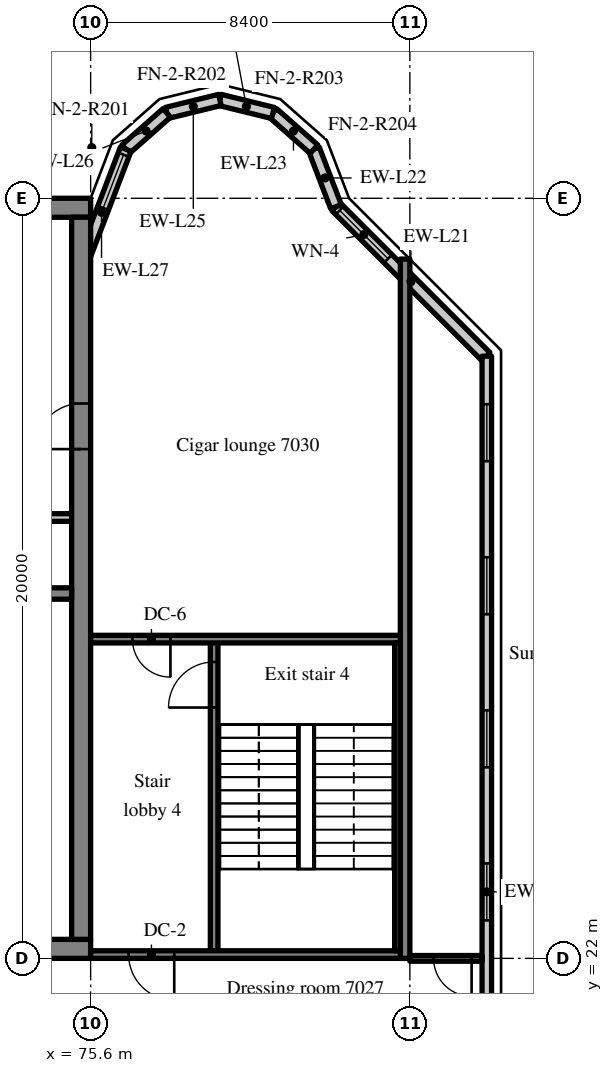
"""IFC4 building model, lengths in metres.
Left out: names, types, materials, properties, quantities, classifications, styles, units other than length and angle.
Written with IfcOpenShell. Run it as: python <this file> out.ifc"""

import sys

from ifc_helpers import new_model, si_unit, direction, frame, frame_2d, origin, place, context, subcontext, project, spatial, rectangle, extrude, source, transform, mapped, element, fill, save


model = new_model("IFC4")
c1 = context("Model", 3, precision=1e-05, world=origin(), true_north=direction((0.0, 1.0)))
c2 = subcontext(c1, "Body", "Model", "MODEL_VIEW")
j1 = project(units=[si_unit("LENGTHUNIT", "METRE"), si_unit("PLANEANGLEUNIT", "RADIAN")], contexts=[c1])
p1 = place(None, origin())
s1 = spatial("IfcSite", under=j1, at=p1, CompositionType="ELEMENT")
p2 = place(p1, origin())
s2 = spatial("IfcBuilding", under=s1, at=p2, CompositionType="ELEMENT")
p3 = place(p2, frame((0.0, 0.0, 293.7)))
s3 = spatial("IfcBuildingStorey", under=s2, at=p3, CompositionType="ELEMENT", Elevation=293.7)
m1 = source(origin(), c2, "Body", "SweptSolid", [
    extrude(rectangle(XDim=50.4, YDim=0.5, at=frame_2d((25.2, 0.0))), origin(), (0.0, 0.0, 1.0), 3.72),
])
p4 = place(p3, frame((25.2, 22.25, 0.0), z_axis=(0.0, 0.0, 1.0), x_axis=(1.0, 0.0, 0.0)))
e1 = element("IfcWall", 1, at=p4, inside=s3, PredefinedType="SHEAR", context=c2, shape_type="MappedRepresentation", body=[
    mapped(m1, transform((0.0, 0.0, 0.0), scale=1.0)),
])
m2 = source(origin(), c2, "Body", "SweptSolid", [
    extrude(rectangle(XDim=1.8, YDim=2.1, at=frame_2d((0.9, 1.05))), frame((0.0, 0.26, 0.0), z_axis=(0.0, -1.0, 0.0), x_axis=(1.0, 0.0, 0.0)), (0.0, 0.0, 1.0), 0.52),
])
p5 = place(p4, frame((15.9, 0.0, 0.0)))
e2 = element("IfcOpeningElement", 2, at=p5, cuts=e1, PredefinedType="OPENING", context=c2, shape_type="MappedRepresentation", body=[
    mapped(m2, transform((0.0, 0.0, 0.0), scale=1.0)),
])
m3 = source(origin(), c2, "Body", "SweptSolid", [
    extrude(rectangle(XDim=0.9, YDim=2.1, at=frame_2d((0.45, 1.05))), frame((0.0, 0.26, 0.0), z_axis=(0.0, -1.0, 0.0), x_axis=(1.0, 0.0, 0.0)), (0.0, 0.0, 1.0), 0.52),
])
p6 = place(p4, frame((9.675, 0.0, 0.0)))
e3 = element("IfcOpeningElement", 3, at=p6, cuts=e1, PredefinedType="OPENING", context=c2, shape_type="MappedRepresentation", body=[
    mapped(m3, transform((0.0, 0.0, 0.0), scale=1.0)),
])
p7 = place(p4, frame((21.525, 0.0, 0.0)))
e4 = element("IfcOpeningElement", 4, at=p7, cuts=e1, PredefinedType="OPENING", context=c2, shape_type="MappedRepresentation", body=[
    mapped(m3, transform((0.0, 0.0, 0.0), scale=1.0)),
])
p8 = place(p4, frame((32.7, 0.0, 0.0)))
e5 = element("IfcOpeningElement", 5, at=p8, cuts=e1, PredefinedType="OPENING", context=c2, shape_type="MappedRepresentation", body=[
    mapped(m2, transform((0.0, 0.0, 0.0), scale=1.0)),
])
m4 = source(origin(), c2, "Body", "SweptSolid", [
    extrude(rectangle(XDim=1.2, YDim=2.1, at=frame_2d((0.6, 1.05))), frame((0.0, 0.26, 0.0), z_axis=(0.0, -1.0, 0.0), x_axis=(1.0, 0.0, 0.0)), (0.0, 0.0, 1.0), 0.52),
])
p9 = place(p4, frame((6.5, 0.0, 0.0)))
e6 = element("IfcOpeningElement", 6, at=p9, cuts=e1, PredefinedType="OPENING", context=c2, shape_type="MappedRepresentation", body=[
    mapped(m4, transform((0.0, 0.0, 0.0), scale=1.0)),
])
p10 = place(p4, frame((47.975, 0.0, 0.0)))
e7 = element("IfcOpeningElement", 7, at=p10, cuts=e1, PredefinedType="OPENING", context=c2, shape_type="MappedRepresentation", body=[
    mapped(m4, transform((0.0, 0.0, 0.0), scale=1.0)),
])
p11 = place(p3, frame((25.2, 41.75, 0.0), z_axis=(0.0, 0.0, 1.0), x_axis=(1.0, 0.0, 0.0)))
e8 = element("IfcWall", 8, at=p11, inside=s3, PredefinedType="SHEAR", context=c2, shape_type="MappedRepresentation", body=[
    mapped(m1, transform((0.0, 0.0, 0.0), scale=1.0)),
])
m5 = source(origin(), c2, "Body", "SweptSolid", [
    extrude(rectangle(XDim=19.0, YDim=0.5, at=frame_2d((9.5, 0.0))), origin(), (0.0, 0.0, 1.0), 3.72),
])
p12 = place(p3, frame((75.35, 22.5, 0.0), z_axis=(0.0, 0.0, 1.0), x_axis=(0.0, 1.0, 0.0)))
e9 = element("IfcWall", 9, at=p12, inside=s3, PredefinedType="SHEAR", context=c2, shape_type="MappedRepresentation", body=[
    mapped(m5, transform((0.0, 0.0, 0.0), scale=1.0)),
])
p13 = place(p12, frame((12.9, 0.0, 0.0)))
e10 = element("IfcOpeningElement", 10, at=p13, cuts=e9, PredefinedType="OPENING", context=c2, shape_type="MappedRepresentation", body=[
    mapped(m4, transform((0.0, 0.0, 0.0), scale=1.0)),
])
m6 = source(origin(), c2, "Body", "SweptSolid", [
    extrude(rectangle(XDim=7.75, YDim=0.3, at=frame_2d((3.875, 0.0))), origin(), (0.0, 0.0, 1.0), 3.72),
])
p14 = place(p3, frame((67.35, 31.6, 0.0), z_axis=(0.0, 0.0, 1.0), x_axis=(1.0, 0.0, 0.0)))
e11 = element("IfcWall", 11, at=p14, inside=s3, PredefinedType="SHEAR", context=c2, shape_type="MappedRepresentation", body=[
    mapped(m6, transform((0.0, 0.0, 0.0), scale=1.0)),
])
m7 = source(origin(), c2, "Body", "SweptSolid", [
    extrude(rectangle(XDim=1.1, YDim=2.1, at=frame_2d((0.55, 1.05))), frame((0.0, 0.16, 0.0), z_axis=(0.0, -1.0, 0.0), x_axis=(1.0, 0.0, 0.0)), (0.0, 0.0, 1.0), 0.32),
])
p15 = place(p14, frame((5.875, 0.0, 0.0)))
e12 = element("IfcOpeningElement", 12, at=p15, cuts=e11, PredefinedType="OPENING", context=c2, shape_type="MappedRepresentation", body=[
    mapped(m7, transform((0.0, 0.0, 0.0), scale=1.0)),
])
m8 = source(origin(), c2, "Body", "SweptSolid", [
    extrude(rectangle(XDim=18.4, YDim=0.25, at=frame_2d((9.2, 0.0))), origin(), (0.0, 0.0, 1.0), 3.72),
])
p16 = place(p3, frame((83.875, 22.0, 0.0), z_axis=(0.0, 0.0, 1.0), x_axis=(0.0, 1.0, 0.0)))
e13 = element("IfcWall", 13, at=p16, inside=s3, PredefinedType="SHEAR", context=c2, shape_type="MappedRepresentation", body=[
    mapped(m8, transform((0.0, 0.0, 0.0), scale=1.0)),
])
m9 = source(origin(), c2, "Body", "SweptSolid", [
    extrude(rectangle(XDim=5.576, YDim=0.3, at=frame_2d((2.788, 0.0))), origin(), (0.0, 0.0, 1.0), 3.72),
])
p17 = place(p3, frame((86.0, 37.834, 0.0), z_axis=(0.0, 0.0, 1.0), x_axis=(-0.707106781187, 0.707106781187, 0.0)))
e14 = element("IfcWall", 14, at=p17, inside=s3, PredefinedType="SOLIDWALL", context=c2, shape_type="MappedRepresentation", body=[
    mapped(m9, transform((0.0, 0.0, 0.0), scale=1.0)),
])
m10 = source(origin(), c2, "Body", "SweptSolid", [
    extrude(rectangle(XDim=1.8, YDim=1.5, at=frame_2d((0.9, 0.75))), frame((0.0, 0.16, 0.0), z_axis=(0.0, -1.0, 0.0), x_axis=(1.0, 0.0, 0.0)), (0.0, 0.0, 1.0), 0.32),
])
p18 = place(p17, frame((3.641, 0.0, 0.9)))
e15 = element("IfcOpeningElement", 15, at=p18, cuts=e14, PredefinedType="OPENING", context=c2, shape_type="MappedRepresentation", body=[
    mapped(m10, transform((0.0, 0.0, 0.0), scale=1.0)),
])
m11 = source(origin(), c2, "Body", "SweptSolid", [
    extrude(rectangle(XDim=1.622, YDim=0.3, at=frame_2d((0.811, 0.0))), origin(), (0.0, 0.0, 1.0), 3.72),
])
p19 = place(p3, frame((82.057, 41.777, 0.0), z_axis=(0.0, 0.0, 1.0), x_axis=(-0.357778527068, 0.933806471154, 0.0)))
e16 = element("IfcWall", 16, at=p19, inside=s3, PredefinedType="SOLIDWALL", context=c2, shape_type="MappedRepresentation", body=[
    mapped(m11, transform((0.0, 0.0, 0.0), scale=1.0)),
])
m12 = source(origin(), c2, "Body", "SweptSolid", [
    extrude(rectangle(XDim=1.44, YDim=0.3, at=frame_2d((0.72, 0.0))), origin(), (0.0, 0.0, 1.0), 3.72),
])
p20 = place(p3, frame((81.477, 43.292, 0.0), z_axis=(0.0, 0.0, 1.0), x_axis=(-0.74957555648, 0.661918790432, 0.0)))
e17 = element("IfcWall", 17, at=p20, inside=s3, PredefinedType="SOLIDWALL", context=c2, shape_type="MappedRepresentation", body=[
    mapped(m12, transform((0.0, 0.0, 0.0), scale=1.0)),
])
m13 = source(origin(), c2, "Body", "SweptSolid", [
    extrude(rectangle(XDim=1.439, YDim=0.3, at=frame_2d((0.719, 0.0))), origin(), (0.0, 0.0, 1.0), 3.72),
])
for number, where, z_axis, x_axis in (
    (18, (80.397, 44.245, 0.0), (0.0, 0.0, 1.0), (-0.971, 0.238, 0.0)),
    (19, (79.0, 44.588, 0.0), (0.0, 0.0, 1.0), (-0.971, -0.238, 0.0)),
):
    element("IfcWall", number, at=place(p3, frame(where, z_axis=z_axis, x_axis=x_axis)), inside=s3, PredefinedType="SOLIDWALL", context=c2, shape_type="MappedRepresentation", body=[
        mapped(m13, transform((0.0, 0.0, 0.0), scale=1.0)),
    ])
p21 = place(p3, frame((77.603, 44.245, 0.0), z_axis=(0.0, 0.0, 1.0), x_axis=(-0.74957555648, -0.661918790432, 0.0)))
e20 = element("IfcWall", 20, at=p21, inside=s3, PredefinedType="SOLIDWALL", context=c2, shape_type="MappedRepresentation", body=[
    mapped(m12, transform((0.0, 0.0, 0.0), scale=1.0)),
])
m14 = source(origin(), c2, "Body", "SweptSolid", [
    extrude(rectangle(XDim=3.559, YDim=0.3, at=frame_2d((1.78, 0.0))), origin(), (0.0, 0.0, 1.0), 3.72),
])
p22 = place(p3, frame((76.523, 43.292, 0.0), z_axis=(0.0, 0.0, 1.0), x_axis=(-0.35779745313, -0.933799219604, 0.0)))
e21 = element("IfcWall", 21, at=p22, inside=s3, PredefinedType="SOLIDWALL", context=c2, shape_type="MappedRepresentation", body=[
    mapped(m14, transform((0.0, 0.0, 0.0), scale=1.0)),
])
m15 = source(origin(), c2, "Body", "SweptSolid", [
    extrude(rectangle(XDim=1.5, YDim=2.0, at=frame_2d((0.75, 1.0))), frame((0.0, 0.16, 0.0), z_axis=(0.0, -1.0, 0.0), x_axis=(1.0, 0.0, 0.0)), (0.0, 0.0, 1.0), 0.32),
])
p23 = place(p22, frame((0.156, 0.0, 0.9)))
e22 = element("IfcOpeningElement", 22, at=p23, cuts=e21, PredefinedType="OPENING", context=c2, shape_type="MappedRepresentation", body=[
    mapped(m15, transform((0.0, 0.0, 0.0), scale=1.0)),
])
m16 = source(origin(), c2, "Body", "SweptSolid", [
    extrude(rectangle(XDim=28.189, YDim=0.25, at=frame_2d((14.095, 0.0))), origin(), (0.0, 0.0, 1.0), 3.72),
])
p24 = place(p3, frame((86.025, 9.655, 0.0), z_axis=(0.0, 0.0, 1.0), x_axis=(0.0, 1.0, 0.0)))
e23 = element("IfcWall", 23, at=p24, inside=s3, PredefinedType="SOLIDWALL", context=c2, shape_type="MappedRepresentation", body=[
    mapped(m16, transform((0.0, 0.0, 0.0), scale=1.0)),
])
m17 = source(origin(), c2, "Body", "SweptSolid", [
    extrude(rectangle(XDim=1.5, YDim=1.5, at=frame_2d((0.75, 0.75))), frame((0.0, 0.135, 0.0), z_axis=(0.0, -1.0, 0.0), x_axis=(1.0, 0.0, 0.0)), (0.0, 0.0, 1.0), 0.27),
])
p25 = place(p24, frame((1.263, 0.0, 0.9)))
e24 = element("IfcOpeningElement", 24, at=p25, cuts=e23, PredefinedType="OPENING", context=c2, shape_type="MappedRepresentation", body=[
    mapped(m17, transform((0.0, 0.0, 0.0), scale=1.0)),
])
p26 = place(p24, frame((5.291, 0.0, 0.9)))
e25 = element("IfcOpeningElement", 25, at=p26, cuts=e23, PredefinedType="OPENING", context=c2, shape_type="MappedRepresentation", body=[
    mapped(m17, transform((0.0, 0.0, 0.0), scale=1.0)),
])
p27 = place(p24, frame((9.318, 0.0, 0.9)))
e26 = element("IfcOpeningElement", 26, at=p27, cuts=e23, PredefinedType="OPENING", context=c2, shape_type="MappedRepresentation", body=[
    mapped(m17, transform((0.0, 0.0, 0.0), scale=1.0)),
])
p28 = place(p24, frame((13.345, 0.0, 0.9)))
e27 = element("IfcOpeningElement", 27, at=p28, cuts=e23, PredefinedType="OPENING", context=c2, shape_type="MappedRepresentation", body=[
    mapped(m17, transform((0.0, 0.0, 0.0), scale=1.0)),
])
p29 = place(p24, frame((17.372, 0.0, 0.9)))
e28 = element("IfcOpeningElement", 28, at=p29, cuts=e23, PredefinedType="OPENING", context=c2, shape_type="MappedRepresentation", body=[
    mapped(m17, transform((0.0, 0.0, 0.0), scale=1.0)),
])
p30 = place(p24, frame((21.399, 0.0, 0.9)))
e29 = element("IfcOpeningElement", 29, at=p30, cuts=e23, PredefinedType="OPENING", context=c2, shape_type="MappedRepresentation", body=[
    mapped(m17, transform((0.0, 0.0, 0.0), scale=1.0)),
])
p31 = place(p24, frame((25.426, 0.0, 0.9)))
e30 = element("IfcOpeningElement", 30, at=p31, cuts=e23, PredefinedType="OPENING", context=c2, shape_type="MappedRepresentation", body=[
    mapped(m17, transform((0.0, 0.0, 0.0), scale=1.0)),
])
m18 = source(origin(), c2, "Body", "SweptSolid", [
    extrude(rectangle(XDim=2.65, YDim=0.2, at=frame_2d((1.325, 0.0))), origin(), (0.0, 0.0, 1.0), 3.72),
])
p32 = place(p3, frame((72.45, 33.6, 0.0), z_axis=(0.0, 0.0, 1.0), x_axis=(1.0, 0.0, 0.0)))
e31 = element("IfcWall", 31, at=p32, inside=s3, PredefinedType="SOLIDWALL", context=c2, shape_type="MappedRepresentation", body=[
    mapped(m18, transform((0.0, 0.0, 0.0), scale=1.0)),
])
m19 = source(origin(), c2, "Body", "SweptSolid", [
    extrude(rectangle(XDim=8.3, YDim=0.2, at=frame_2d((4.15, 0.0))), origin(), (0.0, 0.0, 1.0), 3.72),
])
p33 = place(p3, frame((78.85, 22.1, 0.0), z_axis=(0.0, 0.0, 1.0), x_axis=(0.0, 1.0, 0.0)))
e32 = element("IfcWall", 32, at=p33, inside=s3, PredefinedType="SOLIDWALL", context=c2, shape_type="MappedRepresentation", body=[
    mapped(m19, transform((0.0, 0.0, 0.0), scale=1.0)),
])
m20 = source(origin(), c2, "Body", "SweptSolid", [
    extrude(rectangle(XDim=1.2, YDim=2.1, at=frame_2d((0.6, 1.05))), frame((0.0, 0.11, 0.0), z_axis=(0.0, -1.0, 0.0), x_axis=(1.0, 0.0, 0.0)), (0.0, 0.0, 1.0), 0.22),
])
p34 = place(p33, frame((6.5, 0.0, 0.0)))
e33 = element("IfcOpeningElement", 33, at=p34, cuts=e32, PredefinedType="OPENING", context=c2, shape_type="MappedRepresentation", body=[
    mapped(m20, transform((0.0, 0.0, 0.0), scale=1.0)),
])
m21 = source(origin(), c2, "Body", "SweptSolid", [
    extrude(rectangle(XDim=8.15, YDim=0.2, at=frame_2d((4.075, 0.0))), origin(), (0.0, 0.0, 1.0), 3.72),
])
p35 = place(p3, frame((83.75, 22.1, 0.0), z_axis=(0.0, 0.0, 1.0), x_axis=(-1.0, 0.0, 0.0)))
e34 = element("IfcWall", 34, at=p35, inside=s3, PredefinedType="SOLIDWALL", context=c2, shape_type="MappedRepresentation", body=[
    mapped(m21, transform((0.0, 0.0, 0.0), scale=1.0)),
])
p36 = place(p35, frame((5.95, 0.0, 0.0)))
e35 = element("IfcOpeningElement", 35, at=p36, cuts=e34, PredefinedType="OPENING", context=c2, shape_type="MappedRepresentation", body=[
    mapped(m20, transform((0.0, 0.0, 0.0), scale=1.0)),
])
p37 = place(p3, frame((83.75, 30.4, 0.0), z_axis=(0.0, 0.0, 1.0), x_axis=(-1.0, 0.0, 0.0)))
e36 = element("IfcWall", 36, at=p37, inside=s3, PredefinedType="SOLIDWALL", context=c2, shape_type="MappedRepresentation", body=[
    mapped(m21, transform((0.0, 0.0, 0.0), scale=1.0)),
])
m22 = source(origin(), c2, "Body", "SweptSolid", [
    extrude(rectangle(XDim=1.0, YDim=2.1, at=frame_2d((0.5, 1.05))), frame((0.0, 0.11, 0.0), z_axis=(0.0, -1.0, 0.0), x_axis=(1.0, 0.0, 0.0)), (0.0, 0.0, 1.0), 0.22),
])
p38 = place(p37, frame((6.05, 0.0, 0.0)))
e37 = element("IfcOpeningElement", 37, at=p38, cuts=e36, PredefinedType="OPENING", context=c2, shape_type="MappedRepresentation", body=[
    mapped(m22, transform((0.0, 0.0, 0.0), scale=1.0)),
])
m23 = source(origin(), c2, "Body", "SweptSolid", [
    extrude(rectangle(XDim=8.1, YDim=0.15, at=frame_2d((4.05, 0.0))), origin(), (0.0, 0.0, 1.0), 3.72),
])
p39 = place(p3, frame((83.675, 22.2, 0.0), z_axis=(0.0, 0.0, 1.0), x_axis=(0.0, 1.0, 0.0)))
e38 = element("IfcWall", 38, at=p39, inside=s3, PredefinedType="SOLIDWALL", context=c2, shape_type="MappedRepresentation", body=[
    mapped(m23, transform((0.0, 0.0, 0.0), scale=1.0)),
])
m24 = source(origin(), c2, "Body", "SweptSolid", [
    extrude(rectangle(XDim=1.9, YDim=0.15, at=frame_2d((0.95, 0.0))), origin(), (0.0, 0.0, 1.0), 3.02),
])
p40 = place(p3, frame((84.0, 22.0, 0.0), z_axis=(0.0, 0.0, 1.0), x_axis=(1.0, 0.0, 0.0)))
e39 = element("IfcWall", 39, at=p40, inside=s3, PredefinedType="PARTITIONING", context=c2, shape_type="MappedRepresentation", body=[
    mapped(m24, transform((0.0, 0.0, 0.0), scale=1.0)),
])
m25 = source(origin(), c2, "Body", "SweptSolid", [
    extrude(rectangle(XDim=1.0, YDim=2.1, at=frame_2d((0.5, 1.05))), frame((0.0, 0.085, 0.0), z_axis=(0.0, -1.0, 0.0), x_axis=(1.0, 0.0, 0.0)), (0.0, 0.0, 1.0), 0.17),
])
p41 = place(p40, frame((0.625, 0.0, 0.0)))
e40 = element("IfcOpeningElement", 40, at=p41, cuts=e39, PredefinedType="OPENING", context=c2, shape_type="MappedRepresentation", body=[
    mapped(m25, transform((0.0, 0.0, 0.0), scale=1.0)),
])
m26 = source(origin(), c2, "Body", "SweptSolid", [
    extrude(rectangle(XDim=1.8, YDim=1.5, at=frame_2d((0.9, 0.75))), frame((0.0, 0.03, 0.0), z_axis=(0.0, -1.0, 0.0), x_axis=(1.0, 0.0, 0.0)), (0.0, 0.0, 1.0), 0.06),
])
p42 = place(p18, origin())
e41 = element("IfcWindow", 41, at=p42, inside=s3, PartitioningType="SINGLE_PANEL", PredefinedType="WINDOW", context=c2, shape_type="MappedRepresentation", body=[
    mapped(m26, transform((0.0, 0.0, 0.0), scale=1.0)),
])
fill(e15, e41)
m27 = source(origin(), c2, "Body", "SweptSolid", [
    extrude(rectangle(XDim=1.5, YDim=2.0, at=frame_2d((0.75, 1.0))), frame((0.0, 0.03, 0.0), z_axis=(0.0, -1.0, 0.0), x_axis=(1.0, 0.0, 0.0)), (0.0, 0.0, 1.0), 0.06),
])
p43 = place(p23, origin())
e42 = element("IfcWindow", 42, at=p43, inside=s3, PartitioningType="SINGLE_PANEL", PredefinedType="WINDOW", context=c2, shape_type="MappedRepresentation", body=[
    mapped(m27, transform((0.0, 0.0, 0.0), scale=1.0)),
])
fill(e22, e42)
m28 = source(origin(), c2, "Body", "SweptSolid", [
    extrude(rectangle(XDim=1.5, YDim=1.5, at=frame_2d((0.75, 0.75))), frame((0.0, 0.03, 0.0), z_axis=(0.0, -1.0, 0.0), x_axis=(1.0, 0.0, 0.0)), (0.0, 0.0, 1.0), 0.06),
])
p44 = place(p28, origin())
e43 = element("IfcWindow", 43, at=p44, inside=s3, PartitioningType="SINGLE_PANEL", PredefinedType="WINDOW", context=c2, shape_type="MappedRepresentation", body=[
    mapped(m28, transform((0.0, 0.0, 0.0), scale=1.0)),
])
fill(e27, e43)
p45 = place(p29, origin())
e44 = element("IfcWindow", 44, at=p45, inside=s3, PartitioningType="SINGLE_PANEL", PredefinedType="WINDOW", context=c2, shape_type="MappedRepresentation", body=[
    mapped(m28, transform((0.0, 0.0, 0.0), scale=1.0)),
])
fill(e28, e44)
p46 = place(p30, origin())
e45 = element("IfcWindow", 45, at=p46, inside=s3, PartitioningType="SINGLE_PANEL", PredefinedType="WINDOW", context=c2, shape_type="MappedRepresentation", body=[
    mapped(m28, transform((0.0, 0.0, 0.0), scale=1.0)),
])
fill(e29, e45)
p47 = place(p31, origin())
e46 = element("IfcWindow", 46, at=p47, inside=s3, PartitioningType="SINGLE_PANEL", PredefinedType="WINDOW", context=c2, shape_type="MappedRepresentation", body=[
    mapped(m28, transform((0.0, 0.0, 0.0), scale=1.0)),
])
fill(e30, e46)
m29 = source(origin(), c2, "Body", "SweptSolid", [
    extrude(rectangle(XDim=1.2, YDim=2.1, at=frame_2d((0.6, 1.05))), frame((0.0, 0.025, 0.0), z_axis=(0.0, -1.0, 0.0), x_axis=(1.0, 0.0, 0.0)), (0.0, 0.0, 1.0), 0.05),
])
p48 = place(p13, origin())
e47 = element("IfcDoor", 47, at=p48, inside=s3, OperationType="SINGLE_SWING_LEFT", PredefinedType="DOOR", context=c2, shape_type="MappedRepresentation", body=[
    mapped(m29, transform((0.0, 0.0, 0.0), scale=1.0)),
])
fill(e10, e47)
p49 = place(p34, origin())
e48 = element("IfcDoor", 48, at=p49, inside=s3, OperationType="SINGLE_SWING_LEFT", PredefinedType="DOOR", context=c2, shape_type="MappedRepresentation", body=[
    mapped(m29, transform((0.0, 0.0, 0.0), scale=1.0)),
])
fill(e33, e48)
p50 = place(p36, origin())
e49 = element("IfcDoor", 49, at=p50, inside=s3, OperationType="SINGLE_SWING_LEFT", PredefinedType="DOOR", context=c2, shape_type="MappedRepresentation", body=[
    mapped(m29, transform((0.0, 0.0, 0.0), scale=1.0)),
])
fill(e35, e49)
m30 = source(origin(), c2, "Body", "SweptSolid", [
    extrude(rectangle(XDim=1.0, YDim=2.1, at=frame_2d((0.5, 1.05))), frame((0.0, 0.025, 0.0), z_axis=(0.0, -1.0, 0.0), x_axis=(1.0, 0.0, 0.0)), (0.0, 0.0, 1.0), 0.05),
])
p51 = place(p38, origin())
e50 = element("IfcDoor", 50, at=p51, inside=s3, OperationType="SINGLE_SWING_LEFT", PredefinedType="DOOR", context=c2, shape_type="MappedRepresentation", body=[
    mapped(m30, transform((0.0, 0.0, 0.0), scale=1.0)),
])
fill(e37, e50)
p52 = place(p41, origin())
e51 = element("IfcDoor", 51, at=p52, inside=s3, OperationType="SINGLE_SWING_RIGHT", PredefinedType="DOOR", context=c2, shape_type="MappedRepresentation", body=[
    mapped(m30, transform((0.0, 0.0, 0.0), scale=1.0)),
])
fill(e40, e51)
save(model, sys.argv[1])
